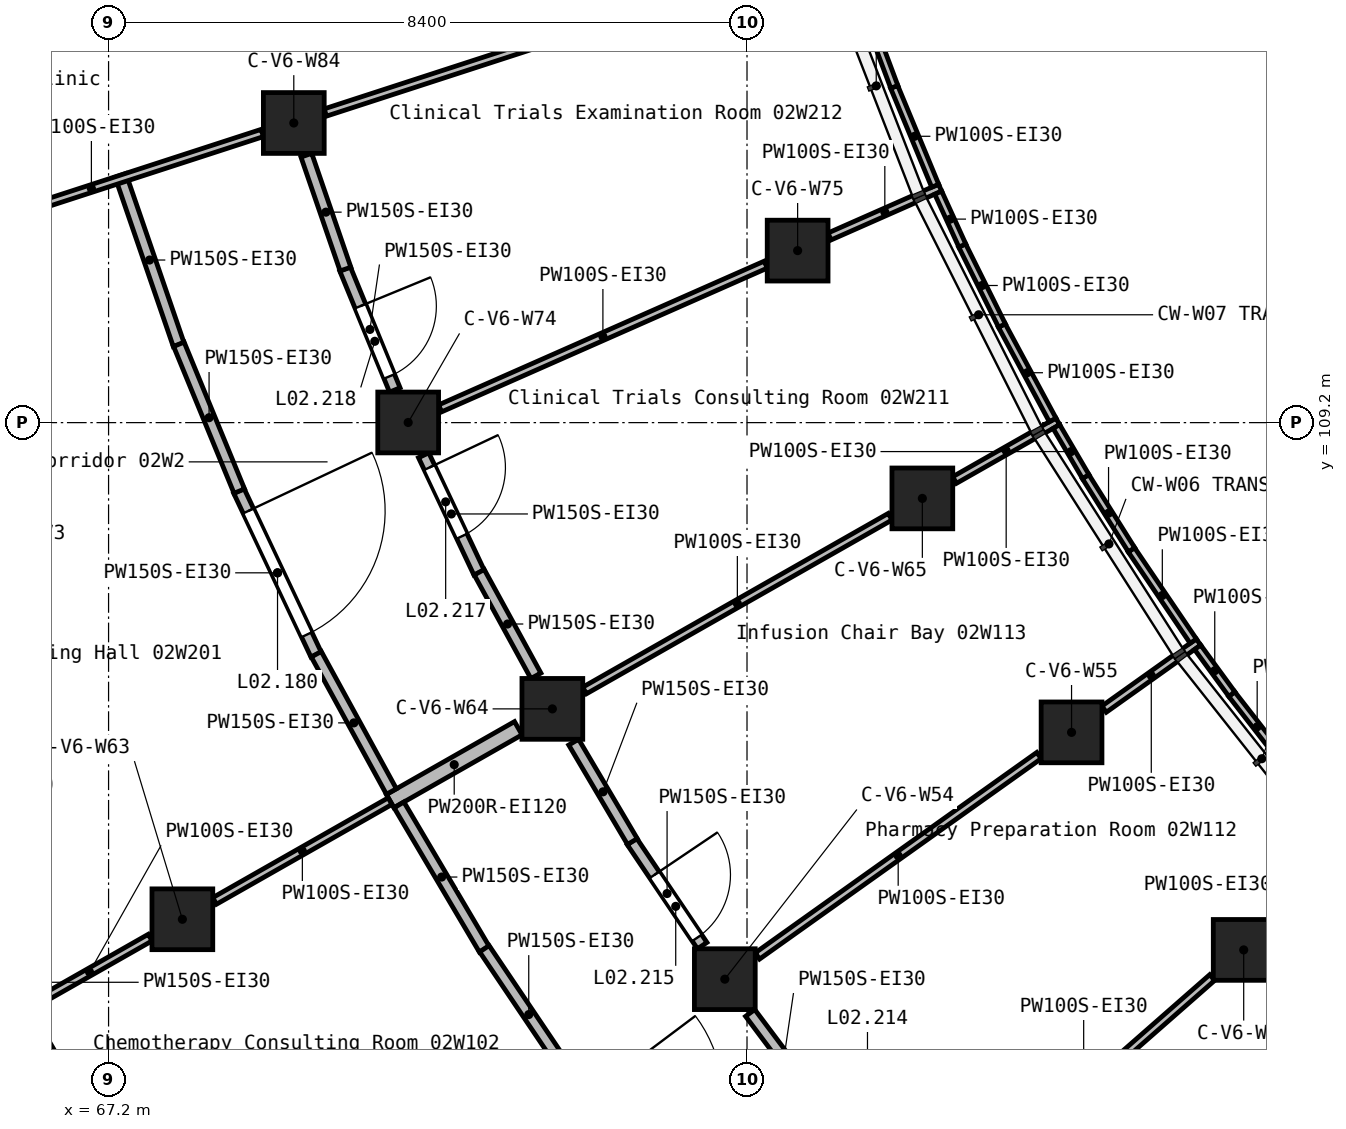
"""IFC4 building model, lengths in metres.
Left out: names, types, materials, properties, quantities, classifications, styles, units other than length and angle.
Written with IfcOpenShell. Run it as: python <this file> out.ifc"""

import sys

from ifc_helpers import new_model, si_unit, direction, frame, frame_2d, origin, origin_2d, place, context, subcontext, project, spatial, rectangle, extrude, element, fill, save


model = new_model("IFC4")
c1 = context("Model", 3, precision=1e-05, world=origin(), true_north=direction((0.0, 1.0)))
c2 = subcontext(c1, "Body", "Model", "MODEL_VIEW")
j1 = project(units=[si_unit("LENGTHUNIT", "METRE"), si_unit("PLANEANGLEUNIT", "RADIAN")], contexts=[c1])
p1 = place(None, origin())
s1 = spatial("IfcSite", under=j1, at=p1, CompositionType="ELEMENT")
p2 = place(p1, origin())
s2 = spatial("IfcBuilding", under=s1, at=p2, CompositionType="ELEMENT")
p3 = place(p2, frame((0.0, 0.0, 12.6)))
s3 = spatial("IfcBuildingStorey", under=s2, at=p3, CompositionType="ELEMENT", Elevation=12.6)
for number, where, z_axis, x_axis in (
    (1, (68.171, 102.666, 0.0), (0.0, 0.0, 1.0), (1.0, 0.0, 0.0)),
    (2, (69.637, 113.142, 0.0), (0.0, 0.0, 1.0), (1.0, 0.0, 0.0)),
    (3, (71.142, 109.202, 0.0), (0.0, 0.0, 1.0), (1.0, 0.0, 0.0)),
    (4, (73.039, 105.434, 0.0), (0.0, 0.0, 1.0), (1.0, 0.0, 0.0)),
    (5, (75.308, 101.878, 0.0), (0.0, 0.0, 1.0), (1.0, 0.0, 0.0)),
    (6, (76.266, 111.463, 0.0), (0.0, 0.0, 1.0), (1.0, 0.0, 0.0)),
    (7, (77.907, 108.203, 0.0), (0.0, 0.0, 1.0), (1.0, 0.0, 0.0)),
    (8, (79.87, 105.125, 0.0), (0.0, 0.0, 1.0), (1.0, 0.0, 0.0)),
    (9, (82.135, 102.263, 0.0), (0.0, 0.0, 1.0), (1.0, 0.0, 0.0)),
):
    element("IfcColumn", number, at=place(p3, frame(where, z_axis=z_axis, x_axis=x_axis)), inside=s3, PredefinedType="COLUMN", context=c2, shape_type="SweptSolid", body=[
        extrude(rectangle(XDim=0.8, YDim=0.8, at=origin_2d()), origin(), (0.0, 0.0, 1.0), 4.2),
    ])
p4 = place(p3, frame((70.905, 104.221, 0.0), z_axis=(0.0, 0.0, 1.0), x_axis=(0.869256176146, 0.494361912198, 0.0)))
e10 = element("IfcWall", 10, at=p4, inside=s3, PredefinedType="SOLIDWALL", context=c2, shape_type="SweptSolid", body=[
    extrude(rectangle(XDim=1.939, YDim=0.2, at=frame_2d((0.97, 0.0))), origin(), (0.0, 0.0, 1.0), 3.85),
])
p5 = place(p3, frame((68.915, 108.301, 0.0), z_axis=(0.0, 0.0, 1.0), x_axis=(0.426631335289, -0.904425620905, 0.0)))
e11 = element("IfcWall", 11, at=p5, inside=s3, PredefinedType="PARTITIONING", context=c2, shape_type="SweptSolid", body=[
    extrude(rectangle(XDim=2.381, YDim=0.15, at=frame_2d((1.19, 0.0))), origin(), (0.0, 0.0, 1.0), 3.85),
])
p6 = place(p5, frame((0.291, 0.0, 0.0)))
e12 = element("IfcOpeningElement", 12, at=p6, cuts=e11, PredefinedType="OPENING", context=c2, shape_type="SweptSolid", body=[
    extrude(rectangle(XDim=1.8, YDim=2.1, at=frame_2d((0.9, 1.05))), frame((0.0, 0.085, 0.0), z_axis=(0.0, -1.0, 0.0), x_axis=(1.0, 0.0, 0.0)), (0.0, 0.0, 1.0), 0.17),
])
p7 = place(p3, frame((71.021, 104.171, 0.0), z_axis=(0.0, 0.0, 1.0), x_axis=(0.50873677225, -0.860922119916, 0.0)))
e13 = element("IfcWall", 13, at=p7, inside=s3, PredefinedType="PARTITIONING", context=c2, shape_type="SweptSolid", body=[
    extrude(rectangle(XDim=2.205, YDim=0.15, at=frame_2d((1.103, 0.0))), origin(), (0.0, 0.0, 1.0), 3.85),
])
p8 = place(p3, frame((67.357, 112.453, 0.0), z_axis=(0.0, 0.0, 1.0), x_axis=(0.32494944972, -0.94573138635, 0.0)))
e14 = element("IfcWall", 14, at=p8, inside=s3, PredefinedType="PARTITIONING", context=c2, shape_type="SweptSolid", body=[
    extrude(rectangle(XDim=2.356, YDim=0.15, at=frame_2d((1.178, 0.0))), origin(), (0.0, 0.0, 1.0), 3.85),
])
p9 = place(p3, frame((72.145, 102.278, 0.0), z_axis=(0.0, 0.0, 1.0), x_axis=(0.558900636953, -0.829234633873, 0.0)))
e15 = element("IfcWall", 15, at=p9, inside=s3, PredefinedType="PARTITIONING", context=c2, shape_type="SweptSolid", body=[
    extrude(rectangle(XDim=2.089, YDim=0.15, at=frame_2d((1.044, 0.0))), origin(), (0.0, 0.0, 1.0), 3.85),
])
p10 = place(p3, frame((69.933, 106.153, 0.0), z_axis=(0.0, 0.0, 1.0), x_axis=(0.479964929401, -0.877287676047, 0.0)))
e16 = element("IfcWall", 16, at=p10, inside=s3, PredefinedType="PARTITIONING", context=c2, shape_type="SweptSolid", body=[
    extrude(rectangle(XDim=2.059, YDim=0.15, at=frame_2d((1.03, 0.0))), origin(), (0.0, 0.0, 1.0), 3.85),
])
p11 = place(p3, frame((68.125, 110.231, 0.0), z_axis=(0.0, 0.0, 1.0), x_axis=(0.38056168262, -0.924755538357, 0.0)))
e17 = element("IfcWall", 17, at=p11, inside=s3, PredefinedType="PARTITIONING", context=c2, shape_type="SweptSolid", body=[
    extrude(rectangle(XDim=2.089, YDim=0.15, at=frame_2d((1.044, 0.0))), origin(), (0.0, 0.0, 1.0), 3.85),
])
p12 = place(p3, frame((74.086, 103.69, 0.0), z_axis=(0.0, 0.0, 1.0), x_axis=(0.558985889655, -0.829177167538, 0.0)))
e18 = element("IfcWall", 18, at=p12, inside=s3, PredefinedType="PARTITIONING", context=c2, shape_type="SweptSolid", body=[
    extrude(rectangle(XDim=1.654, YDim=0.15, at=frame_2d((0.827, 0.0))), origin(), (0.0, 0.0, 1.0), 3.85),
])
p13 = place(p12, frame((0.53, 0.0, 0.0)))
e19 = element("IfcOpeningElement", 19, at=p13, cuts=e18, PredefinedType="OPENING", context=c2, shape_type="SweptSolid", body=[
    extrude(rectangle(XDim=1.0, YDim=2.1, at=frame_2d((0.5, 1.05))), frame((0.0, 0.085, 0.0), z_axis=(0.0, -1.0, 0.0), x_axis=(1.0, 0.0, 0.0)), (0.0, 0.0, 1.0), 0.17),
])
p14 = place(p3, frame((71.346, 108.771, 0.0), z_axis=(0.0, 0.0, 1.0), x_axis=(0.42702903496, -0.904237912997, 0.0)))
e20 = element("IfcWall", 20, at=p14, inside=s3, PredefinedType="PARTITIONING", context=c2, shape_type="SweptSolid", body=[
    extrude(rectangle(XDim=1.708, YDim=0.15, at=frame_2d((0.854, 0.0))), origin(), (0.0, 0.0, 1.0), 3.85),
])
p15 = place(p14, frame((0.178, 0.0, 0.0)))
e21 = element("IfcOpeningElement", 21, at=p15, cuts=e20, PredefinedType="OPENING", context=c2, shape_type="SweptSolid", body=[
    extrude(rectangle(XDim=1.0, YDim=2.1, at=frame_2d((0.5, 1.05))), frame((0.0, 0.085, 0.0), z_axis=(0.0, -1.0, 0.0), x_axis=(1.0, 0.0, 0.0)), (0.0, 0.0, 1.0), 0.17),
])
p16 = place(p3, frame((70.312, 111.222, 0.0), z_axis=(0.0, 0.0, 1.0), x_axis=(0.380150665177, -0.924924576258, 0.0)))
e22 = element("IfcWall", 22, at=p16, inside=s3, PredefinedType="PARTITIONING", context=c2, shape_type="SweptSolid", body=[
    extrude(rectangle(XDim=1.722, YDim=0.15, at=frame_2d((0.861, 0.0))), origin(), (0.0, 0.0, 1.0), 3.85),
])
p17 = place(p16, frame((0.53, 0.0, 0.0)))
e23 = element("IfcOpeningElement", 23, at=p17, cuts=e22, PredefinedType="OPENING", context=c2, shape_type="SweptSolid", body=[
    extrude(rectangle(XDim=1.0, YDim=2.1, at=frame_2d((0.5, 1.05))), frame((0.0, 0.085, 0.0), z_axis=(0.0, -1.0, 0.0), x_axis=(1.0, 0.0, 0.0)), (0.0, 0.0, 1.0), 0.17),
])
p18 = place(p3, frame((73.319, 104.997, 0.0), z_axis=(0.0, 0.0, 1.0), x_axis=(0.508740142918, -0.86092012811, 0.0)))
e24 = element("IfcWall", 24, at=p18, inside=s3, PredefinedType="PARTITIONING", context=c2, shape_type="SweptSolid", body=[
    extrude(rectangle(XDim=1.519, YDim=0.15, at=frame_2d((0.759, 0.0))), origin(), (0.0, 0.0, 1.0), 3.85),
])
p19 = place(p3, frame((75.641, 101.434, 0.0), z_axis=(0.0, 0.0, 1.0), x_axis=(0.60023710435, -0.799822116825, 0.0)))
e25 = element("IfcWall", 25, at=p19, inside=s3, PredefinedType="PARTITIONING", context=c2, shape_type="SweptSolid", body=[
    extrude(rectangle(XDim=1.483, YDim=0.15, at=frame_2d((0.741, 0.0))), origin(), (0.0, 0.0, 1.0), 3.85),
])
p20 = place(p3, frame((72.077, 107.232, 0.0), z_axis=(0.0, 0.0, 1.0), x_axis=(0.480041086357, -0.877246006209, 0.0)))
e26 = element("IfcWall", 26, at=p20, inside=s3, PredefinedType="PARTITIONING", context=c2, shape_type="SweptSolid", body=[
    extrude(rectangle(XDim=1.553, YDim=0.15, at=frame_2d((0.777, 0.0))), origin(), (0.0, 0.0, 1.0), 3.85),
])
p21 = place(p3, frame((69.802, 112.718, 0.0), z_axis=(0.0, 0.0, 1.0), x_axis=(0.32490745983, -0.945745812863, 0.0)))
e27 = element("IfcWall", 27, at=p21, inside=s3, PredefinedType="PARTITIONING", context=c2, shape_type="SweptSolid", body=[
    extrude(rectangle(XDim=1.584, YDim=0.15, at=frame_2d((0.792, 0.0))), origin(), (0.0, 0.0, 1.0), 3.85),
])
p22 = place(p3, frame((66.049, 101.546, 0.0), z_axis=(0.0, 0.0, 1.0), x_axis=(0.503161106297, -0.864192629632, 0.0)))
e28 = element("IfcWall", 28, at=p22, inside=s3, PredefinedType="PARTITIONING", context=c2, shape_type="SweptSolid", body=[
    extrude(rectangle(XDim=1.091, YDim=0.15, at=frame_2d((0.545, 0.0))), origin(), (0.0, 0.0, 1.0), 3.85),
])
p23 = place(p3, frame((64.726, 111.55, 0.0), z_axis=(0.0, 0.0, 1.0), x_axis=(0.951062529891, 0.308998485818, 0.0)))
e29 = element("IfcWall", 29, at=p23, inside=s3, PredefinedType="PARTITIONING", context=c2, shape_type="SweptSolid", body=[
    extrude(rectangle(XDim=4.727, YDim=0.1, at=frame_2d((2.364, 0.0))), origin(), (0.0, 0.0, 1.0), 3.85),
])
p24 = place(p3, frame((70.052, 113.28, 0.0), z_axis=(0.0, 0.0, 1.0), x_axis=(0.951069136727, 0.308978149982, 0.0)))
e30 = element("IfcWall", 30, at=p24, inside=s3, PredefinedType="PARTITIONING", context=c2, shape_type="SweptSolid", body=[
    extrude(rectangle(XDim=7.213, YDim=0.1, at=frame_2d((3.606, 0.0))), origin(), (0.0, 0.0, 1.0), 3.85),
])
p25 = place(p3, frame((71.562, 109.387, 0.0), z_axis=(0.0, 0.0, 1.0), x_axis=(0.914844742968, 0.403805765515, 0.0)))
e31 = element("IfcWall", 31, at=p25, inside=s3, PredefinedType="PARTITIONING", context=c2, shape_type="SweptSolid", body=[
    extrude(rectangle(XDim=4.683, YDim=0.1, at=frame_2d((2.342, 0.0))), origin(), (0.0, 0.0, 1.0), 3.85),
])
p26 = place(p3, frame((76.686, 111.649, 0.0), z_axis=(0.0, 0.0, 1.0), x_axis=(0.914802710669, 0.403900978649, 0.0)))
e32 = element("IfcWall", 32, at=p26, inside=s3, PredefinedType="PARTITIONING", context=c2, shape_type="SweptSolid", body=[
    extrude(rectangle(XDim=1.59, YDim=0.1, at=frame_2d((0.795, 0.0))), origin(), (0.0, 0.0, 1.0), 3.85),
])
p27 = place(p3, frame((78.338, 98.933, 0.0), z_axis=(0.0, 0.0, 1.0), x_axis=(0.751823288541, 0.659364650863, 0.0)))
e33 = element("IfcWall", 33, at=p27, inside=s3, PredefinedType="PARTITIONING", context=c2, shape_type="SweptSolid", body=[
    extrude(rectangle(XDim=4.5, YDim=0.1, at=frame_2d((2.25, 0.0))), origin(), (0.0, 0.0, 1.0), 3.85),
])
p28 = place(p3, frame((75.736, 102.183, 0.0), z_axis=(0.0, 0.0, 1.0), x_axis=(0.8147152487, 0.579861245072, 0.0)))
e34 = element("IfcWall", 34, at=p28, inside=s3, PredefinedType="PARTITIONING", context=c2, shape_type="SweptSolid", body=[
    extrude(rectangle(XDim=4.548, YDim=0.1, at=frame_2d((2.274, 0.0))), origin(), (0.0, 0.0, 1.0), 3.85),
])
p29 = place(p3, frame((80.298, 105.43, 0.0), z_axis=(0.0, 0.0, 1.0), x_axis=(0.814728250396, 0.579842977027, 0.0)))
e35 = element("IfcWall", 35, at=p29, inside=s3, PredefinedType="PARTITIONING", context=c2, shape_type="SweptSolid", body=[
    extrude(rectangle(XDim=1.524, YDim=0.1, at=frame_2d((0.762, 0.0))), origin(), (0.0, 0.0, 1.0), 3.85),
])
p30 = place(p3, frame((73.463, 105.676, 0.0), z_axis=(0.0, 0.0, 1.0), x_axis=(0.8692549769, 0.494364020874, 0.0)))
e36 = element("IfcWall", 36, at=p30, inside=s3, PredefinedType="PARTITIONING", context=c2, shape_type="SweptSolid", body=[
    extrude(rectangle(XDim=4.625, YDim=0.1, at=frame_2d((2.312, 0.0))), origin(), (0.0, 0.0, 1.0), 3.85),
])
p31 = place(p3, frame((78.331, 108.445, 0.0), z_axis=(0.0, 0.0, 1.0), x_axis=(0.869222922884, 0.494420378154, 0.0)))
e37 = element("IfcWall", 37, at=p31, inside=s3, PredefinedType="PARTITIONING", context=c2, shape_type="SweptSolid", body=[
    extrude(rectangle(XDim=1.561, YDim=0.1, at=frame_2d((0.781, 0.0))), origin(), (0.0, 0.0, 1.0), 3.85),
])
p32 = place(p3, frame((66.153, 101.518, 0.0), z_axis=(0.0, 0.0, 1.0), x_axis=(0.869297970102, 0.494288416997, 0.0)))
e38 = element("IfcWall", 38, at=p32, inside=s3, PredefinedType="PARTITIONING", context=c2, shape_type="SweptSolid", body=[
    extrude(rectangle(XDim=1.834, YDim=0.1, at=frame_2d((0.917, 0.0))), origin(), (0.0, 0.0, 1.0), 3.85),
])
p33 = place(p3, frame((68.595, 102.907, 0.0), z_axis=(0.0, 0.0, 1.0), x_axis=(0.869270757215, 0.494336272846, 0.0)))
e39 = element("IfcWall", 39, at=p33, inside=s3, PredefinedType="PARTITIONING", context=c2, shape_type="SweptSolid", body=[
    extrude(rectangle(XDim=2.656, YDim=0.1, at=frame_2d((1.328, 0.0))), origin(), (0.0, 0.0, 1.0), 3.85),
])
p34 = place(p3, frame((80.657, 107.527, 0.0), z_axis=(0.0, 0.0, 1.0), x_axis=(0.561086061718, -0.827757471332, 0.0)))
e40 = element("IfcWall", 40, at=p34, inside=s3, PredefinedType="PARTITIONING", context=c2, shape_type="SweptSolid", body=[
    extrude(rectangle(XDim=1.452, YDim=0.1, at=frame_2d((0.726, 0.0))), origin(), (0.0, 0.0, 1.0), 3.85),
])
p35 = place(p3, frame((78.952, 110.478, 0.0), z_axis=(0.0, 0.0, 1.0), x_axis=(0.474192635092, -0.880421117889, 0.0)))
e41 = element("IfcWall", 41, at=p35, inside=s3, PredefinedType="PARTITIONING", context=c2, shape_type="SweptSolid", body=[
    extrude(rectangle(XDim=1.412, YDim=0.1, at=frame_2d((0.706, 0.0))), origin(), (0.0, 0.0, 1.0), 3.85),
])
p36 = place(p3, frame((77.536, 113.618, 0.0), z_axis=(0.0, 0.0, 1.0), x_axis=(0.383274532271, -0.923634469318, 0.0)))
e42 = element("IfcWall", 42, at=p36, inside=s3, PredefinedType="PARTITIONING", context=c2, shape_type="SweptSolid", body=[
    extrude(rectangle(XDim=1.41, YDim=0.1, at=frame_2d((0.705, 0.0))), origin(), (0.0, 0.0, 1.0), 3.85),
])
p37 = place(p3, frame((77.132, 114.701, 0.0), z_axis=(0.0, 0.0, 1.0), x_axis=(0.350822880831, -0.936441832836, 0.0)))
e43 = element("IfcWall", 43, at=p37, inside=s3, PredefinedType="PARTITIONING", context=c2, shape_type="SweptSolid", body=[
    extrude(rectangle(XDim=1.157, YDim=0.1, at=frame_2d((0.579, 0.0))), origin(), (0.0, 0.0, 1.0), 3.85),
])
p38 = place(p3, frame((78.431, 111.531, 0.0), z_axis=(0.0, 0.0, 1.0), x_axis=(0.445137160255, -0.8954623993, 0.0)))
e44 = element("IfcWall", 44, at=p38, inside=s3, PredefinedType="PARTITIONING", context=c2, shape_type="SweptSolid", body=[
    extrude(rectangle(XDim=1.177, YDim=0.1, at=frame_2d((0.588, 0.0))), origin(), (0.0, 0.0, 1.0), 3.85),
])
p39 = place(p3, frame((80.054, 108.49, 0.0), z_axis=(0.0, 0.0, 1.0), x_axis=(0.531657145883, -0.846959668008, 0.0)))
e45 = element("IfcWall", 45, at=p39, inside=s3, PredefinedType="PARTITIONING", context=c2, shape_type="SweptSolid", body=[
    extrude(rectangle(XDim=1.137, YDim=0.1, at=frame_2d((0.569, 0.0))), origin(), (0.0, 0.0, 1.0), 3.85),
])
p40 = place(p3, frame((81.977, 105.628, 0.0), z_axis=(0.0, 0.0, 1.0), x_axis=(0.61437453726, -0.78901452963, 0.0)))
e46 = element("IfcWall", 46, at=p40, inside=s3, PredefinedType="PARTITIONING", context=c2, shape_type="SweptSolid", body=[
    extrude(rectangle(XDim=1.09, YDim=0.1, at=frame_2d((0.545, 0.0))), origin(), (0.0, 0.0, 1.0), 3.85),
])
p41 = place(p3, frame((78.116, 112.225, 0.0), z_axis=(0.0, 0.0, 1.0), x_axis=(0.414838086324, -0.909895247891, 0.0)))
e47 = element("IfcWall", 47, at=p41, inside=s3, PredefinedType="PARTITIONING", context=c2, shape_type="SweptSolid", body=[
    extrude(rectangle(XDim=0.764, YDim=0.1, at=frame_2d((0.382, 0.0))), origin(), (0.0, 0.0, 1.0), 3.85),
])
p42 = place(p3, frame((79.671, 109.148, 0.0), z_axis=(0.0, 0.0, 1.0), x_axis=(0.505620943658, -0.862755736773, 0.0)))
e48 = element("IfcWall", 48, at=p42, inside=s3, PredefinedType="PARTITIONING", context=c2, shape_type="SweptSolid", body=[
    extrude(rectangle(XDim=0.763, YDim=0.1, at=frame_2d((0.381, 0.0))), origin(), (0.0, 0.0, 1.0), 3.85),
])
p43 = place(p3, frame((81.529, 106.244, 0.0), z_axis=(0.0, 0.0, 1.0), x_axis=(0.590281268128, -0.807197636578, 0.0)))
e49 = element("IfcWall", 49, at=p43, inside=s3, PredefinedType="PARTITIONING", context=c2, shape_type="SweptSolid", body=[
    extrude(rectangle(XDim=0.763, YDim=0.1, at=frame_2d((0.382, 0.0))), origin(), (0.0, 0.0, 1.0), 3.85),
])
p44 = place(p6, origin())
e50 = element("IfcDoor", 50, at=p44, inside=s3, OperationType="DOUBLE_DOOR_SINGLE_SWING", PredefinedType="DOOR", context=c2, shape_type="SweptSolid", body=[
    extrude(rectangle(XDim=1.8, YDim=2.1, at=frame_2d((0.9, 1.05))), frame((0.0, 0.025, 0.0), z_axis=(0.0, -1.0, 0.0), x_axis=(1.0, 0.0, 0.0)), (0.0, 0.0, 1.0), 0.05),
])
fill(e12, e50)
p45 = place(p13, origin())
e51 = element("IfcDoor", 51, at=p45, inside=s3, OperationType="SINGLE_SWING_RIGHT", PredefinedType="DOOR", context=c2, shape_type="SweptSolid", body=[
    extrude(rectangle(XDim=1.0, YDim=2.1, at=frame_2d((0.5, 1.05))), frame((0.0, 0.025, 0.0), z_axis=(0.0, -1.0, 0.0), x_axis=(1.0, 0.0, 0.0)), (0.0, 0.0, 1.0), 0.05),
])
fill(e19, e51)
p46 = place(p15, origin())
e52 = element("IfcDoor", 52, at=p46, inside=s3, OperationType="SINGLE_SWING_LEFT", PredefinedType="DOOR", context=c2, shape_type="SweptSolid", body=[
    extrude(rectangle(XDim=1.0, YDim=2.1, at=frame_2d((0.5, 1.05))), frame((0.0, 0.025, 0.0), z_axis=(0.0, -1.0, 0.0), x_axis=(1.0, 0.0, 0.0)), (0.0, 0.0, 1.0), 0.05),
])
fill(e21, e52)
p47 = place(p17, origin())
e53 = element("IfcDoor", 53, at=p47, inside=s3, OperationType="SINGLE_SWING_RIGHT", PredefinedType="DOOR", context=c2, shape_type="SweptSolid", body=[
    extrude(rectangle(XDim=1.0, YDim=2.1, at=frame_2d((0.5, 1.05))), frame((0.0, 0.025, 0.0), z_axis=(0.0, -1.0, 0.0), x_axis=(1.0, 0.0, 0.0)), (0.0, 0.0, 1.0), 0.05),
])
fill(e23, e53)
save(model, sys.argv[1])
